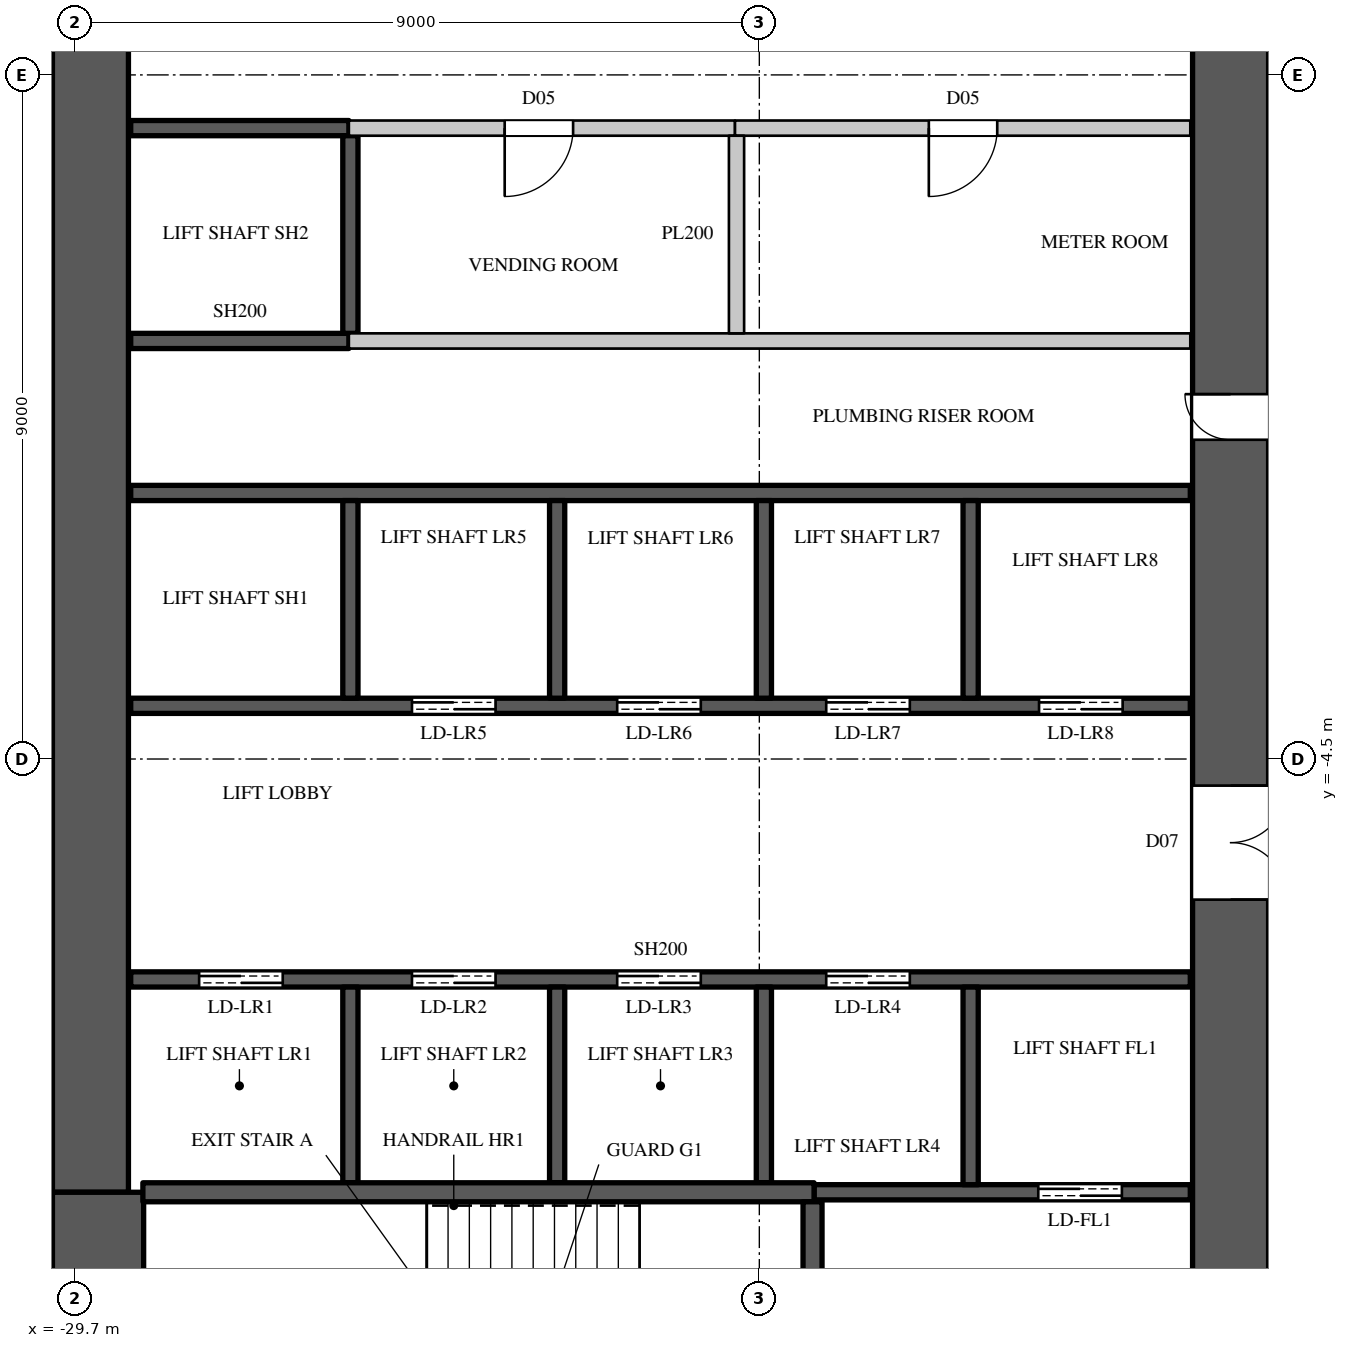
"""IFC4 building model, lengths in metres.
Left out: names, types, materials, properties, quantities, classifications, styles, units other than length and angle.
Written with IfcOpenShell. Run it as: python <this file> out.ifc"""

import sys

from ifc_helpers import new_model, si_unit, direction, frame, frame_2d, origin, place, context, subcontext, project, spatial, rectangle, extrude, element, fill, save


model = new_model("IFC4")
c1 = context("Model", 3, precision=1e-05, world=origin(), true_north=direction((0.0, 1.0)))
c2 = subcontext(c1, "Body", "Model", "MODEL_VIEW")
j1 = project(units=[si_unit("LENGTHUNIT", "METRE"), si_unit("PLANEANGLEUNIT", "RADIAN")], contexts=[c1])
p1 = place(None, origin())
s1 = spatial("IfcSite", under=j1, at=p1, CompositionType="ELEMENT")
p2 = place(p1, origin())
s2 = spatial("IfcBuilding", under=s1, at=p2, CompositionType="ELEMENT")
p3 = place(p2, frame((0.0, 0.0, 59.1)))
s3 = spatial("IfcBuildingStorey", under=s2, at=p3, CompositionType="ELEMENT", Elevation=59.1)
p4 = place(p3, frame((-14.5, -14.8, 0.0), z_axis=(0.0, 0.0, 1.0), x_axis=(0.0, 1.0, 0.0)))
e1 = element("IfcWall", 1, at=p4, inside=s3, PredefinedType="SHEAR", context=c2, shape_type="SweptSolid", body=[
    extrude(rectangle(XDim=29.6, YDim=1.0, at=frame_2d((14.8, 0.0))), origin(), (0.0, 0.0, 1.0), 3.6),
])
p5 = place(p4, frame((8.45, 0.0, 0.0)))
e2 = element("IfcOpeningElement", 2, at=p5, cuts=e1, PredefinedType="OPENING", context=c2, shape_type="SweptSolid", body=[
    extrude(rectangle(XDim=1.5, YDim=2.4, at=frame_2d((0.75, 1.2))), frame((0.0, 0.51, 0.0), z_axis=(0.0, -1.0, 0.0), x_axis=(1.0, 0.0, 0.0)), (0.0, 0.0, 1.0), 1.02),
])
p6 = place(p4, frame((19.65, 0.0, 0.0)))
e3 = element("IfcOpeningElement", 3, at=p6, cuts=e1, PredefinedType="OPENING", context=c2, shape_type="SweptSolid", body=[
    extrude(rectangle(XDim=1.5, YDim=2.4, at=frame_2d((0.75, 1.2))), frame((0.0, 0.51, 0.0), z_axis=(0.0, -1.0, 0.0), x_axis=(1.0, 0.0, 0.0)), (0.0, 0.0, 1.0), 1.02),
])
p7 = place(p4, frame((14.5, 0.0, 0.0)))
e4 = element("IfcOpeningElement", 4, at=p7, cuts=e1, PredefinedType="OPENING", context=c2, shape_type="SweptSolid", body=[
    extrude(rectangle(XDim=0.6, YDim=2.0, at=frame_2d((0.3, 1.0))), frame((0.0, 0.51, 0.0), z_axis=(0.0, -1.0, 0.0), x_axis=(1.0, 0.0, 0.0)), (0.0, 0.0, 1.0), 1.02),
])
p8 = place(p3, frame((-29.5, -10.2, 0.0), z_axis=(0.0, 0.0, 1.0), x_axis=(0.0, 1.0, 0.0)))
e5 = element("IfcWall", 5, at=p8, inside=s3, PredefinedType="SHEAR", context=c2, shape_type="SweptSolid", body=[
    extrude(rectangle(XDim=20.4, YDim=1.0, at=frame_2d((10.2, 0.0))), origin(), (0.0, 0.0, 1.0), 3.6),
])
p9 = place(p3, frame((-29.4, -14.8, 0.0), z_axis=(0.0, 0.0, 1.0), x_axis=(0.0, 1.0, 0.0)))
e6 = element("IfcWall", 6, at=p9, inside=s3, PredefinedType="SHEAR", context=c2, shape_type="SweptSolid", body=[
    extrude(rectangle(XDim=4.6, YDim=1.2, at=frame_2d((2.3, 0.0))), origin(), (0.0, 0.0, 1.0), 3.6),
])
p10 = place(p3, frame((-26.1, 3.8, 0.0), z_axis=(0.0, 0.0, 1.0), x_axis=(1.0, 0.0, 0.0)))
e7 = element("IfcWall", 7, at=p10, inside=s3, PredefinedType="PARTITIONING", context=c2, shape_type="SweptSolid", body=[
    extrude(rectangle(XDim=5.08, YDim=0.2, at=frame_2d((2.54, 0.0))), origin(), (0.0, 0.0, 1.0), 3.3),
])
p11 = place(p10, frame((2.05, 0.0, 0.0)))
e8 = element("IfcOpeningElement", 8, at=p11, cuts=e7, PredefinedType="OPENING", context=c2, shape_type="SweptSolid", body=[
    extrude(rectangle(XDim=0.9, YDim=2.2, at=frame_2d((0.45, 1.1))), frame((0.0, 0.11, 0.0), z_axis=(0.0, -1.0, 0.0), x_axis=(1.0, 0.0, 0.0)), (0.0, 0.0, 1.0), 0.22),
])
p12 = place(p3, frame((-26.1, 1.0, 0.0), z_axis=(0.0, 0.0, 1.0), x_axis=(1.0, 0.0, 0.0)))
e9 = element("IfcWall", 9, at=p12, inside=s3, PredefinedType="PARTITIONING", context=c2, shape_type="SweptSolid", body=[
    extrude(rectangle(XDim=11.07, YDim=0.2, at=frame_2d((5.535, 0.0))), origin(), (0.0, 0.0, 1.0), 3.3),
])
p13 = place(p3, frame((-21.02, 3.8, 0.0), z_axis=(0.0, 0.0, 1.0), x_axis=(1.0, 0.0, 0.0)))
e10 = element("IfcWall", 10, at=p13, inside=s3, PredefinedType="PARTITIONING", context=c2, shape_type="SweptSolid", body=[
    extrude(rectangle(XDim=5.99, YDim=0.2, at=frame_2d((2.995, 0.0))), origin(), (0.0, 0.0, 1.0), 3.3),
])
p14 = place(p13, frame((2.55, 0.0, 0.0)))
e11 = element("IfcOpeningElement", 11, at=p14, cuts=e10, PredefinedType="OPENING", context=c2, shape_type="SweptSolid", body=[
    extrude(rectangle(XDim=0.9, YDim=2.2, at=frame_2d((0.45, 1.1))), frame((0.0, 0.11, 0.0), z_axis=(0.0, -1.0, 0.0), x_axis=(1.0, 0.0, 0.0)), (0.0, 0.0, 1.0), 0.22),
])
p15 = place(p3, frame((-21.0, 1.1, 0.0), z_axis=(0.0, 0.0, 1.0), x_axis=(0.0, 1.0, 0.0)))
e12 = element("IfcWall", 12, at=p15, inside=s3, PredefinedType="PARTITIONING", context=c2, shape_type="SweptSolid", body=[
    extrude(rectangle(XDim=2.6, YDim=0.2, at=frame_2d((1.3, 0.0))), origin(), (0.0, 0.0, 1.0), 3.3),
])
p16 = place(p3, frame((-28.97, -7.4, 0.0), z_axis=(0.0, 0.0, 1.0), x_axis=(1.0, 0.0, 0.0)))
e13 = element("IfcWall", 13, at=p16, inside=s3, PredefinedType="SHEAR", context=c2, shape_type="SweptSolid", body=[
    extrude(rectangle(XDim=13.94, YDim=0.2, at=frame_2d((6.97, 0.0))), origin(), (0.0, 0.0, 1.0), 3.3),
])
p17 = place(p16, frame((0.9, 0.0, 0.0)))
e14 = element("IfcOpeningElement", 14, at=p17, cuts=e13, PredefinedType="OPENING", context=c2, shape_type="SweptSolid", body=[
    extrude(rectangle(XDim=1.1, YDim=2.2, at=frame_2d((0.55, 1.1))), frame((0.0, 0.11, 0.0), z_axis=(0.0, -1.0, 0.0), x_axis=(1.0, 0.0, 0.0)), (0.0, 0.0, 1.0), 0.22),
])
p18 = place(p16, frame((3.7, 0.0, 0.0)))
e15 = element("IfcOpeningElement", 15, at=p18, cuts=e13, PredefinedType="OPENING", context=c2, shape_type="SweptSolid", body=[
    extrude(rectangle(XDim=1.1, YDim=2.2, at=frame_2d((0.55, 1.1))), frame((0.0, 0.11, 0.0), z_axis=(0.0, -1.0, 0.0), x_axis=(1.0, 0.0, 0.0)), (0.0, 0.0, 1.0), 0.22),
])
p19 = place(p16, frame((6.4, 0.0, 0.0)))
e16 = element("IfcOpeningElement", 16, at=p19, cuts=e13, PredefinedType="OPENING", context=c2, shape_type="SweptSolid", body=[
    extrude(rectangle(XDim=1.1, YDim=2.2, at=frame_2d((0.55, 1.1))), frame((0.0, 0.11, 0.0), z_axis=(0.0, -1.0, 0.0), x_axis=(1.0, 0.0, 0.0)), (0.0, 0.0, 1.0), 0.22),
])
p20 = place(p16, frame((9.15, 0.0, 0.0)))
e17 = element("IfcOpeningElement", 17, at=p20, cuts=e13, PredefinedType="OPENING", context=c2, shape_type="SweptSolid", body=[
    extrude(rectangle(XDim=1.1, YDim=2.2, at=frame_2d((0.55, 1.1))), frame((0.0, 0.11, 0.0), z_axis=(0.0, -1.0, 0.0), x_axis=(1.0, 0.0, 0.0)), (0.0, 0.0, 1.0), 0.22),
])
p21 = place(p3, frame((-28.97, -3.8, 0.0), z_axis=(0.0, 0.0, 1.0), x_axis=(1.0, 0.0, 0.0)))
e18 = element("IfcWall", 18, at=p21, inside=s3, PredefinedType="SHEAR", context=c2, shape_type="SweptSolid", body=[
    extrude(rectangle(XDim=13.94, YDim=0.2, at=frame_2d((6.97, 0.0))), origin(), (0.0, 0.0, 1.0), 3.3),
])
p22 = place(p21, frame((3.7, 0.0, 0.0)))
e19 = element("IfcOpeningElement", 19, at=p22, cuts=e18, PredefinedType="OPENING", context=c2, shape_type="SweptSolid", body=[
    extrude(rectangle(XDim=1.1, YDim=2.2, at=frame_2d((0.55, 1.1))), frame((0.0, 0.11, 0.0), z_axis=(0.0, -1.0, 0.0), x_axis=(1.0, 0.0, 0.0)), (0.0, 0.0, 1.0), 0.22),
])
p23 = place(p21, frame((6.4, 0.0, 0.0)))
e20 = element("IfcOpeningElement", 20, at=p23, cuts=e18, PredefinedType="OPENING", context=c2, shape_type="SweptSolid", body=[
    extrude(rectangle(XDim=1.1, YDim=2.2, at=frame_2d((0.55, 1.1))), frame((0.0, 0.11, 0.0), z_axis=(0.0, -1.0, 0.0), x_axis=(1.0, 0.0, 0.0)), (0.0, 0.0, 1.0), 0.22),
])
p24 = place(p21, frame((9.15, 0.0, 0.0)))
e21 = element("IfcOpeningElement", 21, at=p24, cuts=e18, PredefinedType="OPENING", context=c2, shape_type="SweptSolid", body=[
    extrude(rectangle(XDim=1.1, YDim=2.2, at=frame_2d((0.55, 1.1))), frame((0.0, 0.11, 0.0), z_axis=(0.0, -1.0, 0.0), x_axis=(1.0, 0.0, 0.0)), (0.0, 0.0, 1.0), 0.22),
])
p25 = place(p21, frame((11.95, 0.0, 0.0)))
e22 = element("IfcOpeningElement", 22, at=p25, cuts=e18, PredefinedType="OPENING", context=c2, shape_type="SweptSolid", body=[
    extrude(rectangle(XDim=1.1, YDim=2.2, at=frame_2d((0.55, 1.1))), frame((0.0, 0.11, 0.0), z_axis=(0.0, -1.0, 0.0), x_axis=(1.0, 0.0, 0.0)), (0.0, 0.0, 1.0), 0.22),
])
p26 = place(p3, frame((-28.97, -1.0, 0.0), z_axis=(0.0, 0.0, 1.0), x_axis=(1.0, 0.0, 0.0)))
e23 = element("IfcWall", 23, at=p26, inside=s3, PredefinedType="SHEAR", context=c2, shape_type="SweptSolid", body=[
    extrude(rectangle(XDim=13.94, YDim=0.2, at=frame_2d((6.97, 0.0))), origin(), (0.0, 0.0, 1.0), 3.3),
])
for number, where, z_axis, x_axis in (
    (24, (-28.97, 1.0, 0.0), (0.0, 0.0, 1.0), (1.0, 0.0, 0.0)),
    (25, (-28.97, 3.8, 0.0), (0.0, 0.0, 1.0), (1.0, 0.0, 0.0)),
):
    element("IfcWall", number, at=place(p3, frame(where, z_axis=z_axis, x_axis=x_axis)), inside=s3, PredefinedType="SHEAR", context=c2, shape_type="SweptSolid", body=[
        extrude(rectangle(XDim=2.87, YDim=0.2, at=frame_2d((1.435, 0.0))), origin(), (0.0, 0.0, 1.0), 3.3),
    ])
p27 = place(p3, frame((-26.08, -10.075, 0.0), z_axis=(0.0, 0.0, 1.0), x_axis=(0.0, 1.0, 0.0)))
e26 = element("IfcWall", 26, at=p27, inside=s3, PredefinedType="SHEAR", context=c2, shape_type="SweptSolid", body=[
    extrude(rectangle(XDim=2.575, YDim=0.2, at=frame_2d((1.288, 0.0))), origin(), (0.0, 0.0, 1.0), 3.6),
])
p28 = place(p3, frame((-26.08, -3.7, 0.0), z_axis=(0.0, 0.0, 1.0), x_axis=(0.0, 1.0, 0.0)))
e27 = element("IfcWall", 27, at=p28, inside=s3, PredefinedType="SHEAR", context=c2, shape_type="SweptSolid", body=[
    extrude(rectangle(XDim=2.6, YDim=0.2, at=frame_2d((1.3, 0.0))), origin(), (0.0, 0.0, 1.0), 3.6),
])
p29 = place(p3, frame((-26.08, 1.1, 0.0), z_axis=(0.0, 0.0, 1.0), x_axis=(0.0, 1.0, 0.0)))
e28 = element("IfcWall", 28, at=p29, inside=s3, PredefinedType="SHEAR", context=c2, shape_type="SweptSolid", body=[
    extrude(rectangle(XDim=2.6, YDim=0.2, at=frame_2d((1.3, 0.0))), origin(), (0.0, 0.0, 1.0), 3.3),
])
p30 = place(p3, frame((-23.36, -10.075, 0.0), z_axis=(0.0, 0.0, 1.0), x_axis=(0.0, 1.0, 0.0)))
e29 = element("IfcWall", 29, at=p30, inside=s3, PredefinedType="SHEAR", context=c2, shape_type="SweptSolid", body=[
    extrude(rectangle(XDim=2.575, YDim=0.2, at=frame_2d((1.288, 0.0))), origin(), (0.0, 0.0, 1.0), 3.6),
])
p31 = place(p3, frame((-23.36, -3.7, 0.0), z_axis=(0.0, 0.0, 1.0), x_axis=(0.0, 1.0, 0.0)))
e30 = element("IfcWall", 30, at=p31, inside=s3, PredefinedType="SHEAR", context=c2, shape_type="SweptSolid", body=[
    extrude(rectangle(XDim=2.6, YDim=0.2, at=frame_2d((1.3, 0.0))), origin(), (0.0, 0.0, 1.0), 3.6),
])
p32 = place(p3, frame((-20.64, -10.075, 0.0), z_axis=(0.0, 0.0, 1.0), x_axis=(0.0, 1.0, 0.0)))
e31 = element("IfcWall", 31, at=p32, inside=s3, PredefinedType="SHEAR", context=c2, shape_type="SweptSolid", body=[
    extrude(rectangle(XDim=2.575, YDim=0.2, at=frame_2d((1.288, 0.0))), origin(), (0.0, 0.0, 1.0), 3.6),
])
p33 = place(p3, frame((-20.64, -3.7, 0.0), z_axis=(0.0, 0.0, 1.0), x_axis=(0.0, 1.0, 0.0)))
e32 = element("IfcWall", 32, at=p33, inside=s3, PredefinedType="SHEAR", context=c2, shape_type="SweptSolid", body=[
    extrude(rectangle(XDim=2.6, YDim=0.2, at=frame_2d((1.3, 0.0))), origin(), (0.0, 0.0, 1.0), 3.6),
])
p34 = place(p3, frame((-19.98, -10.2, 0.0), z_axis=(0.0, 0.0, 1.0), x_axis=(1.0, 0.0, 0.0)))
e33 = element("IfcWall", 33, at=p34, inside=s3, PredefinedType="SHEAR", context=c2, shape_type="SweptSolid", body=[
    extrude(rectangle(XDim=4.95, YDim=0.2, at=frame_2d((2.475, 0.0))), origin(), (0.0, 0.0, 1.0), 3.3),
])
p35 = place(p34, frame((2.95, 0.0, 0.0)))
e34 = element("IfcOpeningElement", 34, at=p35, cuts=e33, PredefinedType="OPENING", context=c2, shape_type="SweptSolid", body=[
    extrude(rectangle(XDim=1.1, YDim=2.2, at=frame_2d((0.55, 1.1))), frame((0.0, 0.11, 0.0), z_axis=(0.0, -1.0, 0.0), x_axis=(1.0, 0.0, 0.0)), (0.0, 0.0, 1.0), 0.22),
])
p36 = place(p3, frame((-17.92, -10.1, 0.0), z_axis=(0.0, 0.0, 1.0), x_axis=(0.0, 1.0, 0.0)))
e35 = element("IfcWall", 35, at=p36, inside=s3, PredefinedType="SHEAR", context=c2, shape_type="SweptSolid", body=[
    extrude(rectangle(XDim=2.6, YDim=0.2, at=frame_2d((1.3, 0.0))), origin(), (0.0, 0.0, 1.0), 3.6),
])
p37 = place(p3, frame((-17.92, -3.7, 0.0), z_axis=(0.0, 0.0, 1.0), x_axis=(0.0, 1.0, 0.0)))
e36 = element("IfcWall", 36, at=p37, inside=s3, PredefinedType="SHEAR", context=c2, shape_type="SweptSolid", body=[
    extrude(rectangle(XDim=2.6, YDim=0.2, at=frame_2d((1.3, 0.0))), origin(), (0.0, 0.0, 1.0), 3.6),
])
p38 = place(p3, frame((-28.81, -10.2, 0.0), z_axis=(0.0, 0.0, 1.0), x_axis=(1.0, 0.0, 0.0)))
e37 = element("IfcWall", 37, at=p38, inside=s3, PredefinedType="SHEAR", context=c2, shape_type="SweptSolid", body=[
    extrude(rectangle(XDim=8.83, YDim=0.25, at=frame_2d((4.415, 0.0))), origin(), (0.0, 0.0, 1.0), 3.3),
])
p39 = place(p3, frame((-20.0, -14.77, 0.0), z_axis=(0.0, 0.0, 1.0), x_axis=(0.0, 1.0, 0.0)))
e38 = element("IfcWall", 38, at=p39, inside=s3, PredefinedType="SHEAR", context=c2, shape_type="SweptSolid", body=[
    extrude(rectangle(XDim=4.445, YDim=0.25, at=frame_2d((2.223, 0.0))), origin(), (0.0, 0.0, 1.0), 3.3),
])
p40 = place(p39, frame((1.7, 0.0, 0.0)))
e39 = element("IfcOpeningElement", 39, at=p40, cuts=e38, PredefinedType="OPENING", context=c2, shape_type="SweptSolid", body=[
    extrude(rectangle(XDim=1.1, YDim=2.2, at=frame_2d((0.55, 1.1))), frame((0.0, 0.135, 0.0), z_axis=(0.0, -1.0, 0.0), x_axis=(1.0, 0.0, 0.0)), (0.0, 0.0, 1.0), 0.27),
])
p41 = place(p11, origin())
e40 = element("IfcDoor", 40, at=p41, inside=s3, OperationType="SINGLE_SWING_RIGHT", PredefinedType="DOOR", context=c2, shape_type="SweptSolid", body=[
    extrude(rectangle(XDim=0.9, YDim=2.2, at=frame_2d((0.45, 1.1))), frame((0.0, 0.025, 0.0), z_axis=(0.0, -1.0, 0.0), x_axis=(1.0, 0.0, 0.0)), (0.0, 0.0, 1.0), 0.05),
])
fill(e8, e40)
p42 = place(p14, origin())
e41 = element("IfcDoor", 41, at=p42, inside=s3, OperationType="SINGLE_SWING_RIGHT", PredefinedType="DOOR", context=c2, shape_type="SweptSolid", body=[
    extrude(rectangle(XDim=0.9, YDim=2.2, at=frame_2d((0.45, 1.1))), frame((0.0, 0.025, 0.0), z_axis=(0.0, -1.0, 0.0), x_axis=(1.0, 0.0, 0.0)), (0.0, 0.0, 1.0), 0.05),
])
fill(e11, e41)
p43 = place(p17, origin())
e42 = element("IfcDoor", 42, at=p43, inside=s3, OperationType="DOUBLE_DOOR_SLIDING", PredefinedType="DOOR", context=c2, shape_type="SweptSolid", body=[
    extrude(rectangle(XDim=1.1, YDim=2.2, at=frame_2d((0.55, 1.1))), frame((0.0, 0.025, 0.0), z_axis=(0.0, -1.0, 0.0), x_axis=(1.0, 0.0, 0.0)), (0.0, 0.0, 1.0), 0.05),
])
fill(e14, e42)
p44 = place(p18, origin())
e43 = element("IfcDoor", 43, at=p44, inside=s3, OperationType="DOUBLE_DOOR_SLIDING", PredefinedType="DOOR", context=c2, shape_type="SweptSolid", body=[
    extrude(rectangle(XDim=1.1, YDim=2.2, at=frame_2d((0.55, 1.1))), frame((0.0, 0.025, 0.0), z_axis=(0.0, -1.0, 0.0), x_axis=(1.0, 0.0, 0.0)), (0.0, 0.0, 1.0), 0.05),
])
fill(e15, e43)
p45 = place(p19, origin())
e44 = element("IfcDoor", 44, at=p45, inside=s3, OperationType="DOUBLE_DOOR_SLIDING", PredefinedType="DOOR", context=c2, shape_type="SweptSolid", body=[
    extrude(rectangle(XDim=1.1, YDim=2.2, at=frame_2d((0.55, 1.1))), frame((0.0, 0.025, 0.0), z_axis=(0.0, -1.0, 0.0), x_axis=(1.0, 0.0, 0.0)), (0.0, 0.0, 1.0), 0.05),
])
fill(e16, e44)
p46 = place(p20, origin())
e45 = element("IfcDoor", 45, at=p46, inside=s3, OperationType="DOUBLE_DOOR_SLIDING", PredefinedType="DOOR", context=c2, shape_type="SweptSolid", body=[
    extrude(rectangle(XDim=1.1, YDim=2.2, at=frame_2d((0.55, 1.1))), frame((0.0, 0.025, 0.0), z_axis=(0.0, -1.0, 0.0), x_axis=(1.0, 0.0, 0.0)), (0.0, 0.0, 1.0), 0.05),
])
fill(e17, e45)
p47 = place(p35, origin())
e46 = element("IfcDoor", 46, at=p47, inside=s3, OperationType="DOUBLE_DOOR_SLIDING", PredefinedType="DOOR", context=c2, shape_type="SweptSolid", body=[
    extrude(rectangle(XDim=1.1, YDim=2.2, at=frame_2d((0.55, 1.1))), frame((0.0, 0.025, 0.0), z_axis=(0.0, -1.0, 0.0), x_axis=(1.0, 0.0, 0.0)), (0.0, 0.0, 1.0), 0.05),
])
fill(e34, e46)
p48 = place(p22, origin())
e47 = element("IfcDoor", 47, at=p48, inside=s3, OperationType="DOUBLE_DOOR_SLIDING", PredefinedType="DOOR", context=c2, shape_type="SweptSolid", body=[
    extrude(rectangle(XDim=1.1, YDim=2.2, at=frame_2d((0.55, 1.1))), frame((0.0, 0.025, 0.0), z_axis=(0.0, -1.0, 0.0), x_axis=(1.0, 0.0, 0.0)), (0.0, 0.0, 1.0), 0.05),
])
fill(e19, e47)
p49 = place(p23, origin())
e48 = element("IfcDoor", 48, at=p49, inside=s3, OperationType="DOUBLE_DOOR_SLIDING", PredefinedType="DOOR", context=c2, shape_type="SweptSolid", body=[
    extrude(rectangle(XDim=1.1, YDim=2.2, at=frame_2d((0.55, 1.1))), frame((0.0, 0.025, 0.0), z_axis=(0.0, -1.0, 0.0), x_axis=(1.0, 0.0, 0.0)), (0.0, 0.0, 1.0), 0.05),
])
fill(e20, e48)
p50 = place(p24, origin())
e49 = element("IfcDoor", 49, at=p50, inside=s3, OperationType="DOUBLE_DOOR_SLIDING", PredefinedType="DOOR", context=c2, shape_type="SweptSolid", body=[
    extrude(rectangle(XDim=1.1, YDim=2.2, at=frame_2d((0.55, 1.1))), frame((0.0, 0.025, 0.0), z_axis=(0.0, -1.0, 0.0), x_axis=(1.0, 0.0, 0.0)), (0.0, 0.0, 1.0), 0.05),
])
fill(e21, e49)
p51 = place(p25, origin())
e50 = element("IfcDoor", 50, at=p51, inside=s3, OperationType="DOUBLE_DOOR_SLIDING", PredefinedType="DOOR", context=c2, shape_type="SweptSolid", body=[
    extrude(rectangle(XDim=1.1, YDim=2.2, at=frame_2d((0.55, 1.1))), frame((0.0, 0.025, 0.0), z_axis=(0.0, -1.0, 0.0), x_axis=(1.0, 0.0, 0.0)), (0.0, 0.0, 1.0), 0.05),
])
fill(e22, e50)
p52 = place(p5, origin())
e51 = element("IfcDoor", 51, at=p52, inside=s3, OperationType="DOUBLE_DOOR_SINGLE_SWING", PredefinedType="DOOR", context=c2, shape_type="SweptSolid", body=[
    extrude(rectangle(XDim=1.5, YDim=2.4, at=frame_2d((0.75, 1.2))), frame((0.0, -0.445, 0.0), z_axis=(0.0, -1.0, 0.0), x_axis=(1.0, 0.0, 0.0)), (0.0, 0.0, 1.0), 0.05),
])
fill(e2, e51)
p53 = place(p7, origin())
e52 = element("IfcDoor", 52, at=p53, inside=s3, OperationType="SINGLE_SWING_RIGHT", PredefinedType="DOOR", context=c2, shape_type="SweptSolid", body=[
    extrude(rectangle(XDim=0.6, YDim=2.0, at=frame_2d((0.3, 1.0))), frame((0.0, 0.495, 0.0), z_axis=(0.0, -1.0, 0.0), x_axis=(1.0, 0.0, 0.0)), (0.0, 0.0, 1.0), 0.05),
])
fill(e4, e52)
save(model, sys.argv[1])
